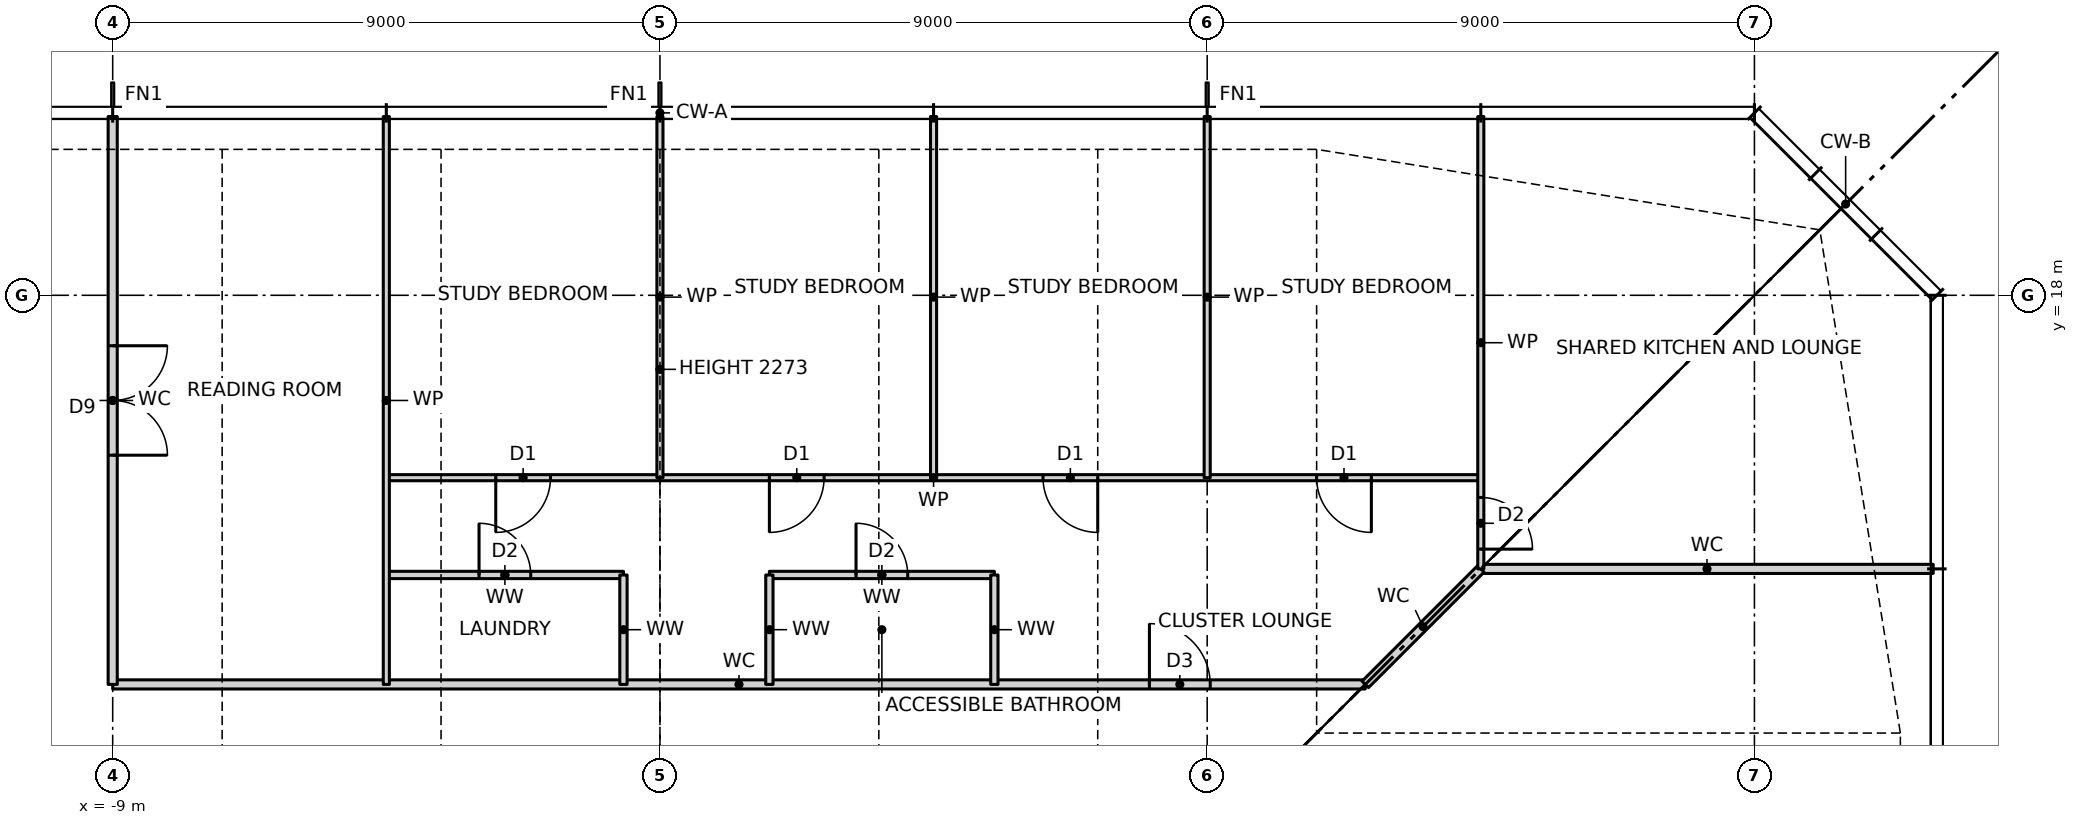
"""IFC4 building model, lengths in metres.
Left out: names, types, materials, properties, quantities, classifications, styles, units other than length and angle.
Written with IfcOpenShell. Run it as: python <this file> out.ifc"""

import sys

from ifc_helpers import new_model, si_unit, direction, frame, frame_2d, origin, place, context, subcontext, project, spatial, rectangle, extrude, element, fill, save


model = new_model("IFC4")
c1 = context("Model", 3, precision=1e-05, world=origin(), true_north=direction((0.0, 1.0)))
c2 = subcontext(c1, "Body", "Model", "MODEL_VIEW")
j1 = project(units=[si_unit("LENGTHUNIT", "METRE"), si_unit("PLANEANGLEUNIT", "RADIAN")], contexts=[c1])
p1 = place(None, origin())
s1 = spatial("IfcSite", under=j1, at=p1, CompositionType="ELEMENT")
p2 = place(p1, origin())
s2 = spatial("IfcBuilding", under=s1, at=p2, CompositionType="ELEMENT")
p3 = place(p2, frame((0.0, 0.0, 140.0)))
s3 = spatial("IfcBuildingStorey", under=s2, at=p3, CompositionType="ELEMENT", Elevation=140.0)
p4 = place(p3, frame((-9.0, 11.6, 0.0), z_axis=(0.0, 0.0, 1.0), x_axis=(1.0, 0.0, 0.0)))
e1 = element("IfcWall", 1, at=p4, inside=s3, PredefinedType="PARTITIONING", context=c2, shape_type="SweptSolid", body=[
    extrude(rectangle(XDim=20.6, YDim=0.15, at=frame_2d((10.3, 0.0))), origin(), (0.0, 0.0, 1.0), 3.2),
])
p5 = place(p4, frame((17.05, 0.0, 0.0)))
e2 = element("IfcOpeningElement", 2, at=p5, cuts=e1, PredefinedType="OPENING", context=c2, shape_type="SweptSolid", body=[
    extrude(rectangle(XDim=1.0, YDim=2.1, at=frame_2d((0.5, 1.05))), frame((0.0, 0.085, 0.0), z_axis=(0.0, -1.0, 0.0), x_axis=(1.0, 0.0, 0.0)), (0.0, 0.0, 1.0), 0.17),
])
p6 = place(p3, frame((-4.5, 13.4, 0.0), z_axis=(0.0, 0.0, 1.0), x_axis=(1.0, 0.0, 0.0)))
e3 = element("IfcWall", 3, at=p6, inside=s3, PredefinedType="PARTITIONING", context=c2, shape_type="SweptSolid", body=[
    extrude(rectangle(XDim=3.9, YDim=0.12, at=frame_2d((1.95, 0.0))), origin(), (0.0, 0.0, 1.0), 3.2),
])
p7 = place(p6, frame((1.525, 0.0, 0.0)))
e4 = element("IfcOpeningElement", 4, at=p7, cuts=e3, PredefinedType="OPENING", context=c2, shape_type="SweptSolid", body=[
    extrude(rectangle(XDim=0.85, YDim=2.1, at=frame_2d((0.425, 1.05))), frame((0.0, 0.07, 0.0), z_axis=(0.0, -1.0, 0.0), x_axis=(1.0, 0.0, 0.0)), (0.0, 0.0, 1.0), 0.14),
])
p8 = place(p3, frame((1.8, 13.4, 0.0), z_axis=(0.0, 0.0, 1.0), x_axis=(1.0, 0.0, 0.0)))
e5 = element("IfcWall", 5, at=p8, inside=s3, PredefinedType="PARTITIONING", context=c2, shape_type="SweptSolid", body=[
    extrude(rectangle(XDim=3.7, YDim=0.12, at=frame_2d((1.85, 0.0))), origin(), (0.0, 0.0, 1.0), 3.2),
])
p9 = place(p8, frame((1.425, 0.0, 0.0)))
e6 = element("IfcOpeningElement", 6, at=p9, cuts=e5, PredefinedType="OPENING", context=c2, shape_type="SweptSolid", body=[
    extrude(rectangle(XDim=0.85, YDim=2.1, at=frame_2d((0.425, 1.05))), frame((0.0, 0.07, 0.0), z_axis=(0.0, -1.0, 0.0), x_axis=(1.0, 0.0, 0.0)), (0.0, 0.0, 1.0), 0.14),
])
p10 = place(p3, frame((13.5, 13.5, 0.0), z_axis=(0.0, 0.0, 1.0), x_axis=(1.0, 0.0, 0.0)))
e7 = element("IfcWall", 7, at=p10, inside=s3, PredefinedType="PARTITIONING", context=c2, shape_type="SweptSolid", body=[
    extrude(rectangle(XDim=7.44, YDim=0.15, at=frame_2d((3.72, 0.0))), origin(), (0.0, 0.0, 1.0), 3.2),
])
p11 = place(p3, frame((-4.5, 15.0, 0.0), z_axis=(0.0, 0.0, 1.0), x_axis=(1.0, 0.0, 0.0)))
e8 = element("IfcWall", 8, at=p11, inside=s3, PredefinedType="PARTITIONING", context=c2, shape_type="SweptSolid", body=[
    extrude(rectangle(XDim=18.0, YDim=0.1, at=frame_2d((9.0, 0.0))), origin(), (0.0, 0.0, 1.0), 3.2),
])
p12 = place(p11, frame((15.3, 0.0, 0.0)))
e9 = element("IfcOpeningElement", 9, at=p12, cuts=e8, PredefinedType="OPENING", context=c2, shape_type="SweptSolid", body=[
    extrude(rectangle(XDim=0.9, YDim=2.1, at=frame_2d((0.45, 1.05))), frame((0.0, 0.06, 0.0), z_axis=(0.0, -1.0, 0.0), x_axis=(1.0, 0.0, 0.0)), (0.0, 0.0, 1.0), 0.12),
])
p13 = place(p11, frame((10.8, 0.0, 0.0)))
e10 = element("IfcOpeningElement", 10, at=p13, cuts=e8, PredefinedType="OPENING", context=c2, shape_type="SweptSolid", body=[
    extrude(rectangle(XDim=0.9, YDim=2.1, at=frame_2d((0.45, 1.05))), frame((0.0, 0.06, 0.0), z_axis=(0.0, -1.0, 0.0), x_axis=(1.0, 0.0, 0.0)), (0.0, 0.0, 1.0), 0.12),
])
p14 = place(p11, frame((6.3, 0.0, 0.0)))
e11 = element("IfcOpeningElement", 11, at=p14, cuts=e8, PredefinedType="OPENING", context=c2, shape_type="SweptSolid", body=[
    extrude(rectangle(XDim=0.9, YDim=2.1, at=frame_2d((0.45, 1.05))), frame((0.0, 0.06, 0.0), z_axis=(0.0, -1.0, 0.0), x_axis=(1.0, 0.0, 0.0)), (0.0, 0.0, 1.0), 0.12),
])
p15 = place(p11, frame((1.8, 0.0, 0.0)))
e12 = element("IfcOpeningElement", 12, at=p15, cuts=e8, PredefinedType="OPENING", context=c2, shape_type="SweptSolid", body=[
    extrude(rectangle(XDim=0.9, YDim=2.1, at=frame_2d((0.45, 1.05))), frame((0.0, 0.06, 0.0), z_axis=(0.0, -1.0, 0.0), x_axis=(1.0, 0.0, 0.0)), (0.0, 0.0, 1.0), 0.12),
])
p16 = place(p3, frame((11.6, 11.6, 0.0), z_axis=(0.0, 0.0, 1.0), x_axis=(0.707106781187, 0.707106781187, 0.0)))
e13 = element("IfcWall", 13, at=p16, inside=s3, PredefinedType="PARTITIONING", context=c2, shape_type="SweptSolid", body=[
    extrude(rectangle(XDim=2.687, YDim=0.15, at=frame_2d((1.343, 0.0))), origin(), (0.0, 0.0, 1.0), 3.2),
])
p17 = place(p3, frame((13.5, 13.5, 0.0), z_axis=(0.0, 0.0, 1.0), x_axis=(0.0, 1.0, 0.0)))
e14 = element("IfcWall", 14, at=p17, inside=s3, PredefinedType="PARTITIONING", context=c2, shape_type="SweptSolid", body=[
    extrude(rectangle(XDim=7.44, YDim=0.1, at=frame_2d((3.72, 0.0))), origin(), (0.0, 0.0, 1.0), 3.2),
])
p18 = place(p17, frame((0.325, 0.0, 0.0)))
e15 = element("IfcOpeningElement", 15, at=p18, cuts=e14, PredefinedType="OPENING", context=c2, shape_type="SweptSolid", body=[
    extrude(rectangle(XDim=0.85, YDim=2.1, at=frame_2d((0.425, 1.05))), frame((0.0, 0.06, 0.0), z_axis=(0.0, -1.0, 0.0), x_axis=(1.0, 0.0, 0.0)), (0.0, 0.0, 1.0), 0.12),
])
p19 = place(p3, frame((9.0, 15.0, 0.0), z_axis=(0.0, 0.0, 1.0), x_axis=(0.0, 1.0, 0.0)))
e16 = element("IfcWall", 16, at=p19, inside=s3, PredefinedType="PARTITIONING", context=c2, shape_type="SweptSolid", body=[
    extrude(rectangle(XDim=5.94, YDim=0.1, at=frame_2d((2.97, 0.0))), origin(), (0.0, 0.0, 1.0), 3.2),
])
p20 = place(p3, frame((5.5, 11.6, 0.0), z_axis=(0.0, 0.0, 1.0), x_axis=(0.0, 1.0, 0.0)))
e17 = element("IfcWall", 17, at=p20, inside=s3, PredefinedType="PARTITIONING", context=c2, shape_type="SweptSolid", body=[
    extrude(rectangle(XDim=1.8, YDim=0.12, at=frame_2d((0.9, 0.0))), origin(), (0.0, 0.0, 1.0), 3.2),
])
p21 = place(p3, frame((4.5, 15.0, 0.0), z_axis=(0.0, 0.0, 1.0), x_axis=(0.0, 1.0, 0.0)))
e18 = element("IfcWall", 18, at=p21, inside=s3, PredefinedType="PARTITIONING", context=c2, shape_type="SweptSolid", body=[
    extrude(rectangle(XDim=5.94, YDim=0.1, at=frame_2d((2.97, 0.0))), origin(), (0.0, 0.0, 1.0), 3.2),
])
p22 = place(p3, frame((1.8, 11.6, 0.0), z_axis=(0.0, 0.0, 1.0), x_axis=(0.0, 1.0, 0.0)))
e19 = element("IfcWall", 19, at=p22, inside=s3, PredefinedType="PARTITIONING", context=c2, shape_type="SweptSolid", body=[
    extrude(rectangle(XDim=1.8, YDim=0.12, at=frame_2d((0.9, 0.0))), origin(), (0.0, 0.0, 1.0), 3.2),
])
p23 = place(p3, frame((0.0, 15.0, 0.0), z_axis=(0.0, 0.0, 1.0), x_axis=(0.0, 1.0, 0.0)))
e20 = element("IfcWall", 20, at=p23, inside=s3, PredefinedType="PARTITIONING", context=c2, shape_type="SweptSolid", body=[
    extrude(rectangle(XDim=5.94, YDim=0.1, at=frame_2d((2.97, 0.0))), origin(), (0.0, 0.0, 1.0), 2.273),
])
p24 = place(p3, frame((-0.6, 11.6, 0.0), z_axis=(0.0, 0.0, 1.0), x_axis=(0.0, 1.0, 0.0)))
e21 = element("IfcWall", 21, at=p24, inside=s3, PredefinedType="PARTITIONING", context=c2, shape_type="SweptSolid", body=[
    extrude(rectangle(XDim=1.8, YDim=0.12, at=frame_2d((0.9, 0.0))), origin(), (0.0, 0.0, 1.0), 3.2),
])
p25 = place(p3, frame((-4.5, 11.6, 0.0), z_axis=(0.0, 0.0, 1.0), x_axis=(0.0, 1.0, 0.0)))
e22 = element("IfcWall", 22, at=p25, inside=s3, PredefinedType="PARTITIONING", context=c2, shape_type="SweptSolid", body=[
    extrude(rectangle(XDim=9.34, YDim=0.1, at=frame_2d((4.67, 0.0))), origin(), (0.0, 0.0, 1.0), 3.2),
])
p26 = place(p3, frame((-9.0, 11.6, 0.0), z_axis=(0.0, 0.0, 1.0), x_axis=(0.0, 1.0, 0.0)))
e23 = element("IfcWall", 23, at=p26, inside=s3, PredefinedType="PARTITIONING", context=c2, shape_type="SweptSolid", body=[
    extrude(rectangle(XDim=9.34, YDim=0.15, at=frame_2d((4.67, 0.0))), origin(), (0.0, 0.0, 1.0), 3.2),
])
p27 = place(p26, frame((3.77, 0.0, 0.0)))
e24 = element("IfcOpeningElement", 24, at=p27, cuts=e23, PredefinedType="OPENING", context=c2, shape_type="SweptSolid", body=[
    extrude(rectangle(XDim=1.8, YDim=2.1, at=frame_2d((0.9, 1.05))), frame((0.0, 0.085, 0.0), z_axis=(0.0, -1.0, 0.0), x_axis=(1.0, 0.0, 0.0)), (0.0, 0.0, 1.0), 0.17),
])
p28 = place(p12, frame((0.9, 0.0, 0.0), z_axis=(0.0, 0.0, 1.0), x_axis=(-1.0, 0.0, 0.0)))
e25 = element("IfcDoor", 25, at=p28, inside=s3, OperationType="SINGLE_SWING_LEFT", PredefinedType="DOOR", context=c2, shape_type="SweptSolid", body=[
    extrude(rectangle(XDim=0.9, YDim=2.1, at=frame_2d((0.45, 1.05))), frame((0.0, 0.025, 0.0), z_axis=(0.0, -1.0, 0.0), x_axis=(1.0, 0.0, 0.0)), (0.0, 0.0, 1.0), 0.05),
])
fill(e9, e25)
p29 = place(p13, frame((0.9, 0.0, 0.0), z_axis=(0.0, 0.0, 1.0), x_axis=(-1.0, 0.0, 0.0)))
e26 = element("IfcDoor", 26, at=p29, inside=s3, OperationType="SINGLE_SWING_LEFT", PredefinedType="DOOR", context=c2, shape_type="SweptSolid", body=[
    extrude(rectangle(XDim=0.9, YDim=2.1, at=frame_2d((0.45, 1.05))), frame((0.0, 0.025, 0.0), z_axis=(0.0, -1.0, 0.0), x_axis=(1.0, 0.0, 0.0)), (0.0, 0.0, 1.0), 0.05),
])
fill(e10, e26)
p30 = place(p14, frame((0.9, 0.0, 0.0), z_axis=(0.0, 0.0, 1.0), x_axis=(-1.0, 0.0, 0.0)))
e27 = element("IfcDoor", 27, at=p30, inside=s3, OperationType="SINGLE_SWING_RIGHT", PredefinedType="DOOR", context=c2, shape_type="SweptSolid", body=[
    extrude(rectangle(XDim=0.9, YDim=2.1, at=frame_2d((0.45, 1.05))), frame((0.0, 0.025, 0.0), z_axis=(0.0, -1.0, 0.0), x_axis=(1.0, 0.0, 0.0)), (0.0, 0.0, 1.0), 0.05),
])
fill(e11, e27)
p31 = place(p15, frame((0.9, 0.0, 0.0), z_axis=(0.0, 0.0, 1.0), x_axis=(-1.0, 0.0, 0.0)))
e28 = element("IfcDoor", 28, at=p31, inside=s3, OperationType="SINGLE_SWING_RIGHT", PredefinedType="DOOR", context=c2, shape_type="SweptSolid", body=[
    extrude(rectangle(XDim=0.9, YDim=2.1, at=frame_2d((0.45, 1.05))), frame((0.0, 0.025, 0.0), z_axis=(0.0, -1.0, 0.0), x_axis=(1.0, 0.0, 0.0)), (0.0, 0.0, 1.0), 0.05),
])
fill(e12, e28)
p32 = place(p5, origin())
e29 = element("IfcDoor", 29, at=p32, inside=s3, OperationType="SINGLE_SWING_LEFT", PredefinedType="DOOR", context=c2, shape_type="SweptSolid", body=[
    extrude(rectangle(XDim=1.0, YDim=2.1, at=frame_2d((0.5, 1.05))), frame((0.0, 0.025, 0.0), z_axis=(0.0, -1.0, 0.0), x_axis=(1.0, 0.0, 0.0)), (0.0, 0.0, 1.0), 0.05),
])
fill(e2, e29)
p33 = place(p9, origin())
e30 = element("IfcDoor", 30, at=p33, inside=s3, OperationType="SINGLE_SWING_LEFT", PredefinedType="DOOR", context=c2, shape_type="SweptSolid", body=[
    extrude(rectangle(XDim=0.85, YDim=2.1, at=frame_2d((0.425, 1.05))), frame((0.0, 0.025, 0.0), z_axis=(0.0, -1.0, 0.0), x_axis=(1.0, 0.0, 0.0)), (0.0, 0.0, 1.0), 0.05),
])
fill(e6, e30)
p34 = place(p7, origin())
e31 = element("IfcDoor", 31, at=p34, inside=s3, OperationType="SINGLE_SWING_LEFT", PredefinedType="DOOR", context=c2, shape_type="SweptSolid", body=[
    extrude(rectangle(XDim=0.85, YDim=2.1, at=frame_2d((0.425, 1.05))), frame((0.0, 0.025, 0.0), z_axis=(0.0, -1.0, 0.0), x_axis=(1.0, 0.0, 0.0)), (0.0, 0.0, 1.0), 0.05),
])
fill(e4, e31)
p35 = place(p27, frame((1.8, 0.0, 0.0), z_axis=(0.0, 0.0, 1.0), x_axis=(-1.0, 0.0, 0.0)))
e32 = element("IfcDoor", 32, at=p35, inside=s3, OperationType="DOUBLE_DOOR_SINGLE_SWING", PredefinedType="DOOR", context=c2, shape_type="SweptSolid", body=[
    extrude(rectangle(XDim=1.8, YDim=2.1, at=frame_2d((0.9, 1.05))), frame((0.0, 0.025, 0.0), z_axis=(0.0, -1.0, 0.0), x_axis=(1.0, 0.0, 0.0)), (0.0, 0.0, 1.0), 0.05),
])
fill(e24, e32)
p36 = place(p18, frame((0.85, 0.0, 0.0), z_axis=(0.0, 0.0, 1.0), x_axis=(-1.0, 0.0, 0.0)))
e33 = element("IfcDoor", 33, at=p36, inside=s3, OperationType="SINGLE_SWING_RIGHT", PredefinedType="DOOR", context=c2, shape_type="SweptSolid", body=[
    extrude(rectangle(XDim=0.85, YDim=2.1, at=frame_2d((0.425, 1.05))), frame((0.0, 0.025, 0.0), z_axis=(0.0, -1.0, 0.0), x_axis=(1.0, 0.0, 0.0)), (0.0, 0.0, 1.0), 0.05),
])
fill(e15, e33)
save(model, sys.argv[1])
